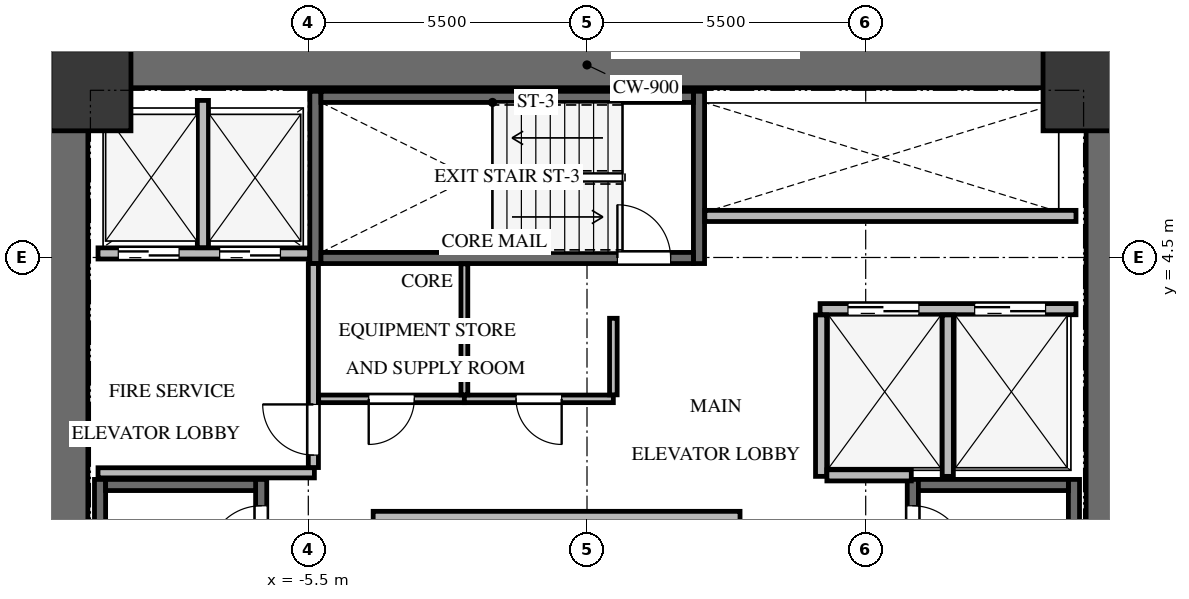
"""IFC4 building model, lengths in metres.
Left out: names, types, materials, properties, quantities, classifications, styles, units other than length and angle.
Written with IfcOpenShell. Run it as: python <this file> out.ifc"""

import sys

from ifc_helpers import new_model, si_unit, direction, frame, frame_2d, origin, origin_2d, place, context, subcontext, project, spatial, rectangle, extrude, source, transform, mapped, element, fill, save


model = new_model("IFC4")
c1 = context("Model", 3, precision=1e-05, world=origin(), true_north=direction((0.0, 1.0)))
c2 = subcontext(c1, "Body", "Model", "MODEL_VIEW")
j1 = project(units=[si_unit("LENGTHUNIT", "METRE"), si_unit("PLANEANGLEUNIT", "RADIAN")], contexts=[c1])
p1 = place(None, origin())
s1 = spatial("IfcSite", under=j1, at=p1, CompositionType="ELEMENT")
p2 = place(p1, origin())
s2 = spatial("IfcBuilding", under=s1, at=p2, CompositionType="ELEMENT")
p3 = place(p2, frame((0.0, 0.0, 62.1)))
s3 = spatial("IfcBuildingStorey", under=s2, at=p3, CompositionType="ELEMENT", Elevation=62.1)
for number, where, z_axis, x_axis in (
    (1, (-10.3, -8.75, 0.0), (0.0, 0.0, 1.0), (0.0, 1.0, 0.0)),
    (2, (10.3, -8.75, 0.0), (0.0, 0.0, 1.0), (0.0, 1.0, 0.0)),
):
    element("IfcWall", number, at=place(p3, frame(where, z_axis=z_axis, x_axis=x_axis)), inside=s3, PredefinedType="SHEAR", context=c2, shape_type="SweptSolid", body=[
        extrude(rectangle(XDim=17.5, YDim=0.9, at=frame_2d((8.75, 0.0))), origin(), (0.0, 0.0, 1.0), 3.3),
    ])
p4 = place(p3, frame((-9.85, 8.3, 0.0), z_axis=(0.0, 0.0, 1.0), x_axis=(1.0, 0.0, 0.0)))
e3 = element("IfcWall", 3, at=p4, inside=s3, PredefinedType="SHEAR", context=c2, shape_type="SweptSolid", body=[
    extrude(rectangle(XDim=19.7, YDim=0.9, at=frame_2d((9.85, 0.0))), origin(), (0.0, 0.0, 1.0), 3.3),
])
p5 = place(p3, frame((-6.43, -7.77, -0.24), z_axis=(0.0, 0.0, 1.0), x_axis=(0.0, 1.0, 0.0)))
e4 = element("IfcWall", 4, at=p5, inside=s3, PredefinedType="SHEAR", context=c2, shape_type="SweptSolid", body=[
    extrude(rectangle(XDim=7.89, YDim=0.22, at=frame_2d((3.945, 0.0))), origin(), (0.0, 0.0, 1.0), 3.3),
])
p6 = place(p5, frame((6.32, 0.0, 0.0)))
e5 = element("IfcOpeningElement", 5, at=p6, cuts=e4, PredefinedType="OPENING", context=c2, shape_type="SweptSolid", body=[
    extrude(rectangle(XDim=1.05, YDim=2.15, at=frame_2d((0.525, 1.075))), frame((0.0, 0.12, 0.0), z_axis=(0.0, -1.0, 0.0), x_axis=(1.0, 0.0, 0.0)), (0.0, 0.0, 1.0), 0.24),
])
p7 = place(p3, frame((-9.61, 0.12, -0.24), z_axis=(0.0, 0.0, 1.0), x_axis=(0.0, -1.0, 0.0)))
e6 = element("IfcWall", 6, at=p7, inside=s3, PredefinedType="SHEAR", context=c2, shape_type="SweptSolid", body=[
    extrude(rectangle(XDim=7.89, YDim=0.22, at=frame_2d((3.945, 0.0))), origin(), (0.0, 0.0, 1.0), 3.3),
])
p8 = place(p3, frame((-6.54, 0.01, -0.24), z_axis=(0.0, 0.0, 1.0), x_axis=(-1.0, 0.0, 0.0)))
e7 = element("IfcWall", 7, at=p8, inside=s3, PredefinedType="SHEAR", context=c2, shape_type="SweptSolid", body=[
    extrude(rectangle(XDim=2.96, YDim=0.22, at=frame_2d((1.48, 0.0))), origin(), (0.0, 0.0, 1.0), 3.3),
])
p9 = place(p3, frame((9.61, -7.77, -0.24), z_axis=(0.0, 0.0, 1.0), x_axis=(0.0, 1.0, 0.0)))
e8 = element("IfcWall", 8, at=p9, inside=s3, PredefinedType="SHEAR", context=c2, shape_type="SweptSolid", body=[
    extrude(rectangle(XDim=7.89, YDim=0.22, at=frame_2d((3.945, 0.0))), origin(), (0.0, 0.0, 1.0), 3.3),
])
p10 = place(p3, frame((6.43, 0.12, -0.24), z_axis=(0.0, 0.0, 1.0), x_axis=(0.0, -1.0, 0.0)))
e9 = element("IfcWall", 9, at=p10, inside=s3, PredefinedType="SHEAR", context=c2, shape_type="SweptSolid", body=[
    extrude(rectangle(XDim=7.89, YDim=0.22, at=frame_2d((3.945, 0.0))), origin(), (0.0, 0.0, 1.0), 3.3),
])
p11 = place(p10, frame((0.52, 0.0, 0.0)))
e10 = element("IfcOpeningElement", 10, at=p11, cuts=e9, PredefinedType="OPENING", context=c2, shape_type="SweptSolid", body=[
    extrude(rectangle(XDim=1.05, YDim=2.15, at=frame_2d((0.525, 1.075))), frame((0.0, 0.12, 0.0), z_axis=(0.0, -1.0, 0.0), x_axis=(1.0, 0.0, 0.0)), (0.0, 0.0, 1.0), 0.24),
])
p12 = place(p3, frame((9.5, 0.01, -0.24), z_axis=(0.0, 0.0, 1.0), x_axis=(-1.0, 0.0, 0.0)))
e11 = element("IfcWall", 11, at=p12, inside=s3, PredefinedType="SHEAR", context=c2, shape_type="SweptSolid", body=[
    extrude(rectangle(XDim=2.96, YDim=0.22, at=frame_2d((1.48, 0.0))), origin(), (0.0, 0.0, 1.0), 3.3),
])
for number, where, z_axis, x_axis in (
    (12, (2.21, 4.38, -0.24), (0.0, 0.0, 1.0), (0.0, 1.0, 0.0)),
    (13, (-5.36, 7.78, -0.24), (0.0, 0.0, 1.0), (0.0, -1.0, 0.0)),
):
    element("IfcWall", number, at=place(p3, frame(where, z_axis=z_axis, x_axis=x_axis)), inside=s3, PredefinedType="SHEAR", context=c2, shape_type="SweptSolid", body=[
        extrude(rectangle(XDim=3.4, YDim=0.22, at=frame_2d((1.7, 0.0))), origin(), (0.0, 0.0, 1.0), 3.3),
    ])
p13 = place(p3, frame((-5.25, 4.49, -0.24), z_axis=(0.0, 0.0, 1.0), x_axis=(1.0, 0.0, 0.0)))
e14 = element("IfcWall", 14, at=p13, inside=s3, PredefinedType="SHEAR", context=c2, shape_type="SweptSolid", body=[
    extrude(rectangle(XDim=7.35, YDim=0.22, at=frame_2d((3.675, 0.0))), origin(), (0.0, 0.0, 1.0), 3.3),
])
p14 = place(p13, frame((5.85, 0.0, 0.0)))
e15 = element("IfcOpeningElement", 15, at=p14, cuts=e14, PredefinedType="OPENING", context=c2, shape_type="SweptSolid", body=[
    extrude(rectangle(XDim=1.05, YDim=2.15, at=frame_2d((0.525, 1.075))), frame((0.0, 0.12, 0.0), z_axis=(0.0, -1.0, 0.0), x_axis=(1.0, 0.0, 0.0)), (0.0, 0.0, 1.0), 0.24),
])
p15 = place(p3, frame((2.1, 7.67, -0.24), z_axis=(0.0, 0.0, 1.0), x_axis=(-1.0, 0.0, 0.0)))
e16 = element("IfcWall", 16, at=p15, inside=s3, PredefinedType="SHEAR", context=c2, shape_type="SweptSolid", body=[
    extrude(rectangle(XDim=7.35, YDim=0.22, at=frame_2d((3.675, 0.0))), origin(), (0.0, 0.0, 1.0), 3.3),
])
m1 = source(origin(), c2, "Body", "SweptSolid", [
    extrude(rectangle(XDim=1.6, YDim=1.6, at=origin_2d()), origin(), (0.0, 0.0, 1.0), 3.3),
])
for number, where, z_axis, x_axis in (
    (17, (9.8, 7.8, -0.24), (0.0, 0.0, 1.0), (1.0, 0.0, 0.0)),
    (18, (-9.8, 7.8, -0.24), (0.0, 0.0, 1.0), (1.0, 0.0, 0.0)),
):
    element("IfcColumn", number, at=place(p3, frame(where, z_axis=z_axis, x_axis=x_axis)), inside=s3, PredefinedType="COLUMN", context=c2, shape_type="MappedRepresentation", body=[
        mapped(m1, transform((0.0, 0.0, 0.0), x_axis=(1.0, 0.0, 0.0), y_axis=(0.0, 1.0, 0.0), z_axis=(0.0, 0.0, 1.0), scale=1.0)),
    ])
p16 = place(p3, frame((-9.65, 4.58, 0.0), z_axis=(0.0, 0.0, 1.0), x_axis=(1.0, 0.0, 0.0)))
e19 = element("IfcWall", 19, at=p16, inside=s3, PredefinedType="SOLIDWALL", context=c2, shape_type="SweptSolid", body=[
    extrude(rectangle(XDim=4.175, YDim=0.22, at=frame_2d((2.087, 0.0))), origin(), (0.0, 0.0, 1.0), 3.045),
])
p17 = place(p16, frame((0.4, 0.0, 0.0)))
e20 = element("IfcOpeningElement", 20, at=p17, cuts=e19, PredefinedType="OPENING", context=c2, shape_type="SweptSolid", body=[
    extrude(rectangle(XDim=1.2, YDim=2.15, at=frame_2d((0.6, 1.075))), frame((0.0, 0.12, 0.0), z_axis=(0.0, -1.0, 0.0), x_axis=(1.0, 0.0, 0.0)), (0.0, 0.0, 1.0), 0.24),
])
p18 = place(p16, frame((2.4, 0.0, 0.0)))
e21 = element("IfcOpeningElement", 21, at=p18, cuts=e19, PredefinedType="OPENING", context=c2, shape_type="SweptSolid", body=[
    extrude(rectangle(XDim=1.2, YDim=2.15, at=frame_2d((0.6, 1.075))), frame((0.0, 0.12, 0.0), z_axis=(0.0, -1.0, 0.0), x_axis=(1.0, 0.0, 0.0)), (0.0, 0.0, 1.0), 0.24),
])
p19 = place(p3, frame((-7.58, 4.694, 0.0), z_axis=(0.0, 0.0, 1.0), x_axis=(0.0, 1.0, 0.0)))
e22 = element("IfcWall", 22, at=p19, inside=s3, PredefinedType="SOLIDWALL", context=c2, shape_type="SweptSolid", body=[
    extrude(rectangle(XDim=2.906, YDim=0.22, at=frame_2d((1.453, 0.0))), origin(), (0.0, 0.0, 1.0), 3.045),
])
p20 = place(p3, frame((-9.65, 0.25, 0.0), z_axis=(0.0, 0.0, 1.0), x_axis=(1.0, 0.0, 0.0)))
e23 = element("IfcWall", 23, at=p20, inside=s3, PredefinedType="SOLIDWALL", context=c2, shape_type="SweptSolid", body=[
    extrude(rectangle(XDim=4.27, YDim=0.2, at=frame_2d((2.135, 0.0))), origin(), (0.0, 0.0, 1.0), 3.045),
])
p21 = place(p3, frame((-5.4, 0.354, 0.0), z_axis=(0.0, 0.0, 1.0), x_axis=(0.0, 1.0, 0.0)))
e24 = element("IfcWall", 24, at=p21, inside=s3, PredefinedType="SOLIDWALL", context=c2, shape_type="SweptSolid", body=[
    extrude(rectangle(XDim=4.026, YDim=0.2, at=frame_2d((2.013, 0.0))), origin(), (0.0, 0.0, 1.0), 3.045),
])
p22 = place(p21, frame((0.246, 0.0, 0.0)))
e25 = element("IfcOpeningElement", 25, at=p22, cuts=e24, PredefinedType="OPENING", context=c2, shape_type="SweptSolid", body=[
    extrude(rectangle(XDim=1.0, YDim=2.15, at=frame_2d((0.5, 1.075))), frame((0.0, 0.11, 0.0), z_axis=(0.0, -1.0, 0.0), x_axis=(1.0, 0.0, 0.0)), (0.0, 0.0, 1.0), 0.22),
])
p23 = place(p3, frame((4.6, 3.48, 0.0), z_axis=(0.0, 0.0, 1.0), x_axis=(1.0, 0.0, 0.0)))
e26 = element("IfcWall", 26, at=p23, inside=s3, PredefinedType="SOLIDWALL", context=c2, shape_type="SweptSolid", body=[
    extrude(rectangle(XDim=5.05, YDim=0.22, at=frame_2d((2.525, 0.0))), origin(), (0.0, 0.0, 1.0), 3.045),
])
p24 = place(p23, frame((0.55, 0.0, 0.0)))
e27 = element("IfcOpeningElement", 27, at=p24, cuts=e26, PredefinedType="OPENING", context=c2, shape_type="SweptSolid", body=[
    extrude(rectangle(XDim=1.4, YDim=2.15, at=frame_2d((0.7, 1.075))), frame((0.0, 0.12, 0.0), z_axis=(0.0, -1.0, 0.0), x_axis=(1.0, 0.0, 0.0)), (0.0, 0.0, 1.0), 0.24),
])
p25 = place(p23, frame((3.05, 0.0, 0.0)))
e28 = element("IfcOpeningElement", 28, at=p25, cuts=e26, PredefinedType="OPENING", context=c2, shape_type="SweptSolid", body=[
    extrude(rectangle(XDim=1.4, YDim=2.15, at=frame_2d((0.7, 1.075))), frame((0.0, 0.12, 0.0), z_axis=(0.0, -1.0, 0.0), x_axis=(1.0, 0.0, 0.0)), (0.0, 0.0, 1.0), 0.24),
])
for number, where, z_axis, x_axis in (
    (29, (4.62, 0.18, 0.0), (0.0, 0.0, 1.0), (0.0, 1.0, 0.0)),
    (30, (7.12, 0.18, 0.0), (0.0, 0.0, 1.0), (0.0, 1.0, 0.0)),
):
    element("IfcWall", number, at=place(p3, frame(where, z_axis=z_axis, x_axis=x_axis)), inside=s3, PredefinedType="SOLIDWALL", context=c2, shape_type="SweptSolid", body=[
        extrude(rectangle(XDim=3.186, YDim=0.22, at=frame_2d((1.593, 0.0))), origin(), (0.0, 0.0, 1.0), 3.045),
    ])
p26 = place(p3, frame((4.734, 0.2, 0.0), z_axis=(0.0, 0.0, 1.0), x_axis=(1.0, 0.0, 0.0)))
e31 = element("IfcWall", 31, at=p26, inside=s3, PredefinedType="SOLIDWALL", context=c2, shape_type="SweptSolid", body=[
    extrude(rectangle(XDim=1.666, YDim=0.22, at=frame_2d((0.833, 0.0))), origin(), (0.0, 0.0, 1.0), 3.045),
])
p27 = place(p3, frame((-4.22, -0.62, 0.0), z_axis=(0.0, 0.0, 1.0), x_axis=(1.0, 0.0, 0.0)))
e32 = element("IfcWall", 32, at=p27, inside=s3, PredefinedType="SOLIDWALL", context=c2, shape_type="SweptSolid", body=[
    extrude(rectangle(XDim=7.24, YDim=0.22, at=frame_2d((3.62, 0.0))), origin(), (0.0, 0.0, 1.0), 3.045),
])
p28 = place(p3, frame((2.325, 5.32, 0.0), z_axis=(0.0, 0.0, 1.0), x_axis=(1.0, 0.0, 0.0)))
e33 = element("IfcWall", 33, at=p28, inside=s3, PredefinedType="SOLIDWALL", context=c2, shape_type="SweptSolid", body=[
    extrude(rectangle(XDim=7.325, YDim=0.22, at=frame_2d((3.663, 0.0))), origin(), (0.0, 0.0, 1.0), 3.045),
])
p29 = place(p3, frame((-2.42, 1.71, 0.0), z_axis=(0.0, 0.0, 1.0), x_axis=(-1.0, 0.0, 0.0)))
e34 = element("IfcWall", 34, at=p29, inside=s3, PredefinedType="PARTITIONING", context=c2, shape_type="SweptSolid", body=[
    extrude(rectangle(XDim=2.876, YDim=0.15, at=frame_2d((1.438, 0.0))), origin(), (0.0, 0.0, 1.0), 3.045),
])
p30 = place(p29, frame((0.988, 0.0, 0.0)))
e35 = element("IfcOpeningElement", 35, at=p30, cuts=e34, PredefinedType="OPENING", context=c2, shape_type="SweptSolid", body=[
    extrude(rectangle(XDim=0.9, YDim=2.05, at=frame_2d((0.45, 1.025))), frame((0.0, 0.085, 0.0), z_axis=(0.0, -1.0, 0.0), x_axis=(1.0, 0.0, 0.0)), (0.0, 0.0, 1.0), 0.17),
])
p31 = place(p3, frame((0.52, 1.71, 0.0), z_axis=(0.0, 0.0, 1.0), x_axis=(-1.0, 0.0, 0.0)))
e36 = element("IfcWall", 36, at=p31, inside=s3, PredefinedType="PARTITIONING", context=c2, shape_type="SweptSolid", body=[
    extrude(rectangle(XDim=2.94, YDim=0.15, at=frame_2d((1.47, 0.0))), origin(), (0.0, 0.0, 1.0), 3.045),
])
p32 = place(p31, frame((1.02, 0.0, 0.0)))
e37 = element("IfcOpeningElement", 37, at=p32, cuts=e36, PredefinedType="OPENING", context=c2, shape_type="SweptSolid", body=[
    extrude(rectangle(XDim=0.9, YDim=2.05, at=frame_2d((0.45, 1.025))), frame((0.0, 0.085, 0.0), z_axis=(0.0, -1.0, 0.0), x_axis=(1.0, 0.0, 0.0)), (0.0, 0.0, 1.0), 0.17),
])
p33 = place(p3, frame((0.52, 3.3, 0.0), z_axis=(0.0, 0.0, 1.0), x_axis=(0.0, -1.0, 0.0)))
e38 = element("IfcWall", 38, at=p33, inside=s3, PredefinedType="PARTITIONING", context=c2, shape_type="SweptSolid", body=[
    extrude(rectangle(XDim=1.511, YDim=0.15, at=frame_2d((0.755, 0.0))), origin(), (0.0, 0.0, 1.0), 3.045),
])
p34 = place(p3, frame((-2.42, 4.375, 0.0), z_axis=(0.0, 0.0, 1.0), x_axis=(0.0, -1.0, 0.0)))
e39 = element("IfcWall", 39, at=p34, inside=s3, PredefinedType="PARTITIONING", context=c2, shape_type="SweptSolid", body=[
    extrude(rectangle(XDim=2.586, YDim=0.135, at=frame_2d((1.293, 0.0))), origin(), (0.0, 0.0, 1.0), 3.045),
])
m2 = source(origin(), c2, "Body", "SweptSolid", [
    extrude(rectangle(XDim=1.05, YDim=2.15, at=frame_2d((0.525, 1.075))), frame((0.0, 0.025, 0.0), z_axis=(0.0, -1.0, 0.0), x_axis=(1.0, 0.0, 0.0)), (0.0, 0.0, 1.0), 0.05),
])
p35 = place(p6, origin())
e40 = element("IfcDoor", 40, at=p35, inside=s3, OperationType="SINGLE_SWING_LEFT", PredefinedType="DOOR", context=c2, shape_type="MappedRepresentation", body=[
    mapped(m2, transform((0.0, 0.0, 0.0), x_axis=(1.0, 0.0, 0.0), y_axis=(0.0, 1.0, 0.0), z_axis=(0.0, 0.0, 1.0), scale=1.0)),
])
fill(e5, e40)
m3 = source(origin(), c2, "Body", "SweptSolid", [
    extrude(rectangle(XDim=1.05, YDim=2.15, at=frame_2d((0.525, 1.075))), frame((0.0, 0.025, 0.0), z_axis=(0.0, -1.0, 0.0), x_axis=(1.0, 0.0, 0.0)), (0.0, 0.0, 1.0), 0.05),
])
p36 = place(p11, origin())
e41 = element("IfcDoor", 41, at=p36, inside=s3, OperationType="SINGLE_SWING_RIGHT", PredefinedType="DOOR", context=c2, shape_type="MappedRepresentation", body=[
    mapped(m3, transform((0.0, 0.0, 0.0), x_axis=(1.0, 0.0, 0.0), y_axis=(0.0, 1.0, 0.0), z_axis=(0.0, 0.0, 1.0), scale=1.0)),
])
fill(e10, e41)
p37 = place(p14, origin())
e42 = element("IfcDoor", 42, at=p37, inside=s3, OperationType="SINGLE_SWING_LEFT", PredefinedType="DOOR", context=c2, shape_type="MappedRepresentation", body=[
    mapped(m2, transform((0.0, 0.0, 0.0), x_axis=(1.0, 0.0, 0.0), y_axis=(0.0, 1.0, 0.0), z_axis=(0.0, 0.0, 1.0), scale=1.0)),
])
fill(e15, e42)
m4 = source(origin(), c2, "Body", "SweptSolid", [
    extrude(rectangle(XDim=1.2, YDim=2.15, at=frame_2d((0.6, 1.075))), frame((0.0, 0.025, 0.0), z_axis=(0.0, -1.0, 0.0), x_axis=(1.0, 0.0, 0.0)), (0.0, 0.0, 1.0), 0.05),
])
p38 = place(p17, origin())
e43 = element("IfcDoor", 43, at=p38, inside=s3, OperationType="DOUBLE_DOOR_SLIDING", PredefinedType="DOOR", context=c2, shape_type="MappedRepresentation", body=[
    mapped(m4, transform((0.0, 0.0, 0.0), x_axis=(1.0, 0.0, 0.0), y_axis=(0.0, 1.0, 0.0), z_axis=(0.0, 0.0, 1.0), scale=1.0)),
])
fill(e20, e43)
p39 = place(p18, origin())
e44 = element("IfcDoor", 44, at=p39, inside=s3, OperationType="DOUBLE_DOOR_SLIDING", PredefinedType="DOOR", context=c2, shape_type="MappedRepresentation", body=[
    mapped(m4, transform((0.0, 0.0, 0.0), x_axis=(1.0, 0.0, 0.0), y_axis=(0.0, 1.0, 0.0), z_axis=(0.0, 0.0, 1.0), scale=1.0)),
])
fill(e21, e44)
m5 = source(origin(), c2, "Body", "SweptSolid", [
    extrude(rectangle(XDim=1.0, YDim=2.15, at=frame_2d((0.5, 1.075))), frame((0.0, 0.025, 0.0), z_axis=(0.0, -1.0, 0.0), x_axis=(1.0, 0.0, 0.0)), (0.0, 0.0, 1.0), 0.05),
])
p40 = place(p22, origin())
e45 = element("IfcDoor", 45, at=p40, inside=s3, OperationType="SINGLE_SWING_RIGHT", PredefinedType="DOOR", context=c2, shape_type="MappedRepresentation", body=[
    mapped(m5, transform((0.0, 0.0, 0.0), x_axis=(1.0, 0.0, 0.0), y_axis=(0.0, 1.0, 0.0), z_axis=(0.0, 0.0, 1.0), scale=1.0)),
])
fill(e25, e45)
m6 = source(origin(), c2, "Body", "SweptSolid", [
    extrude(rectangle(XDim=1.4, YDim=2.15, at=frame_2d((0.7, 1.075))), frame((0.0, 0.025, 0.0), z_axis=(0.0, -1.0, 0.0), x_axis=(1.0, 0.0, 0.0)), (0.0, 0.0, 1.0), 0.05),
])
p41 = place(p24, origin())
e46 = element("IfcDoor", 46, at=p41, inside=s3, OperationType="DOUBLE_DOOR_SLIDING", PredefinedType="DOOR", context=c2, shape_type="MappedRepresentation", body=[
    mapped(m6, transform((0.0, 0.0, 0.0), x_axis=(1.0, 0.0, 0.0), y_axis=(0.0, 1.0, 0.0), z_axis=(0.0, 0.0, 1.0), scale=1.0)),
])
fill(e27, e46)
p42 = place(p25, origin())
e47 = element("IfcDoor", 47, at=p42, inside=s3, OperationType="DOUBLE_DOOR_SLIDING", PredefinedType="DOOR", context=c2, shape_type="MappedRepresentation", body=[
    mapped(m6, transform((0.0, 0.0, 0.0), x_axis=(1.0, 0.0, 0.0), y_axis=(0.0, 1.0, 0.0), z_axis=(0.0, 0.0, 1.0), scale=1.0)),
])
fill(e28, e47)
m7 = source(origin(), c2, "Body", "SweptSolid", [
    extrude(rectangle(XDim=0.9, YDim=2.05, at=frame_2d((0.45, 1.025))), frame((0.0, 0.025, 0.0), z_axis=(0.0, -1.0, 0.0), x_axis=(1.0, 0.0, 0.0)), (0.0, 0.0, 1.0), 0.05),
])
p43 = place(p30, origin())
e48 = element("IfcDoor", 48, at=p43, inside=s3, OperationType="SINGLE_SWING_RIGHT", PredefinedType="DOOR", context=c2, shape_type="MappedRepresentation", body=[
    mapped(m7, transform((0.0, 0.0, 0.0), x_axis=(1.0, 0.0, 0.0), y_axis=(0.0, 1.0, 0.0), z_axis=(0.0, 0.0, 1.0), scale=1.0)),
])
fill(e35, e48)
m8 = source(origin(), c2, "Body", "SweptSolid", [
    extrude(rectangle(XDim=0.9, YDim=2.05, at=frame_2d((0.45, 1.025))), frame((0.0, 0.025, 0.0), z_axis=(0.0, -1.0, 0.0), x_axis=(1.0, 0.0, 0.0)), (0.0, 0.0, 1.0), 0.05),
])
p44 = place(p32, origin())
e49 = element("IfcDoor", 49, at=p44, inside=s3, OperationType="SINGLE_SWING_LEFT", PredefinedType="DOOR", context=c2, shape_type="MappedRepresentation", body=[
    mapped(m8, transform((0.0, 0.0, 0.0), x_axis=(1.0, 0.0, 0.0), y_axis=(0.0, 1.0, 0.0), z_axis=(0.0, 0.0, 1.0), scale=1.0)),
])
fill(e37, e49)
save(model, sys.argv[1])
